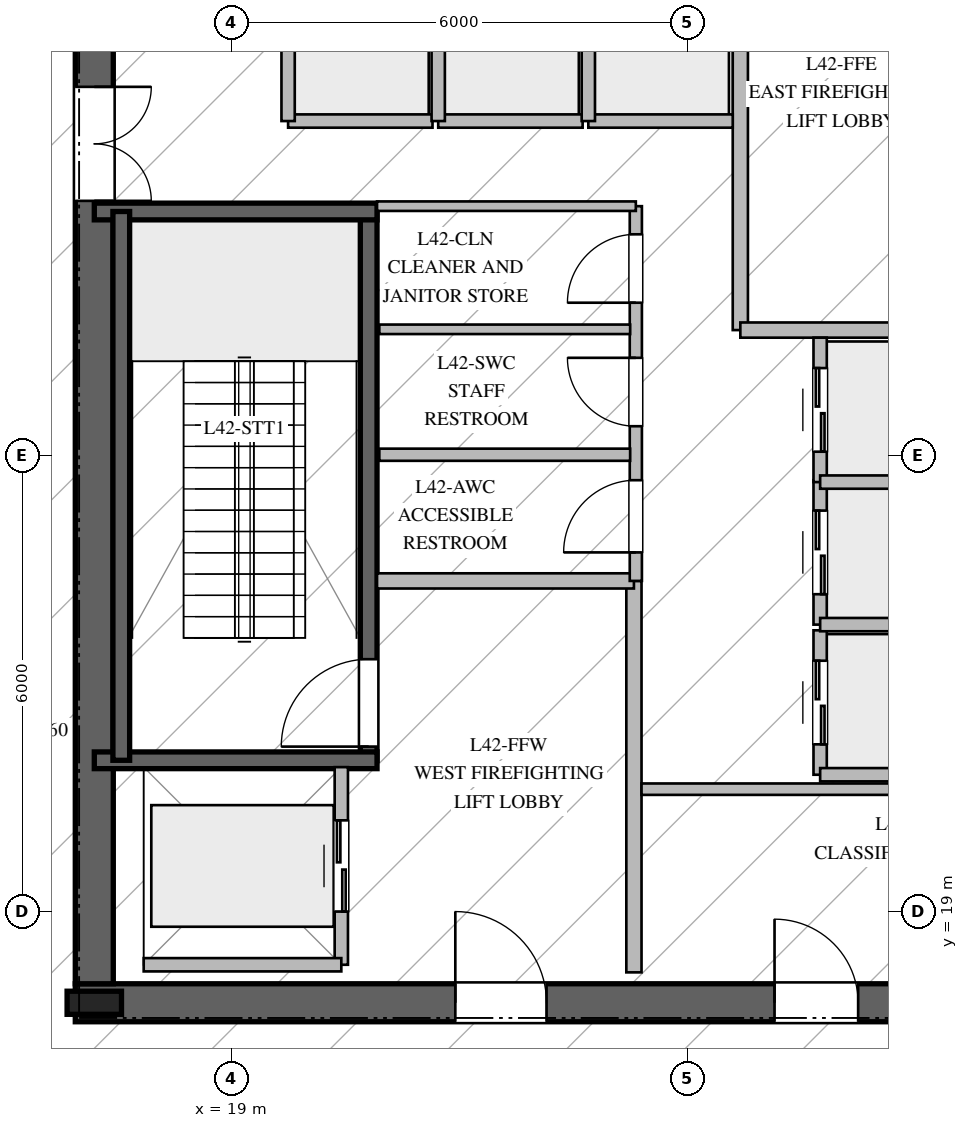
"""IFC4 building model, lengths in metres.
Left out: names, types, materials, properties, quantities, classifications, styles, units other than length and angle.
Written with IfcOpenShell. Run it as: python <this file> out.ifc"""

import sys

from ifc_helpers import new_model, si_unit, direction, frame, frame_2d, origin, origin_2d, place, context, subcontext, project, spatial, rectangle, i_section, extrude, element, fill, save


model = new_model("IFC4")
c1 = context("Model", 3, precision=1e-05, world=origin(), true_north=direction((0.0, 1.0)))
c2 = subcontext(c1, "Body", "Model", "MODEL_VIEW")
j1 = project(units=[si_unit("LENGTHUNIT", "METRE"), si_unit("PLANEANGLEUNIT", "RADIAN")], contexts=[c1])
p1 = place(None, origin())
s1 = spatial("IfcSite", under=j1, at=p1, CompositionType="ELEMENT")
p2 = place(p1, origin())
s2 = spatial("IfcBuilding", under=s1, at=p2, CompositionType="ELEMENT")
p3 = place(p2, frame((0.0, 0.0, 175.8)))
s3 = spatial("IfcBuildingStorey", under=s2, at=p3, CompositionType="ELEMENT", Elevation=175.8)
p4 = place(p3, frame((16.95, 17.8, 0.0), z_axis=(0.0, 0.0, 1.0), x_axis=(1.0, 0.0, 0.0)))
e1 = element("IfcWall", 1, at=p4, inside=s3, PredefinedType="SHEAR", context=c2, shape_type="SweptSolid", body=[
    extrude(rectangle(XDim=16.1, YDim=0.5, at=frame_2d((8.05, 0.0))), origin(), (0.0, 0.0, 1.0), 4.78),
])
p5 = place(p4, frame((5.0, 0.0, 0.0)))
e2 = element("IfcOpeningElement", 2, at=p5, cuts=e1, PredefinedType="OPENING", context=c2, shape_type="SweptSolid", body=[
    extrude(rectangle(XDim=1.2, YDim=2.25, at=frame_2d((0.6, 1.125))), frame((0.0, 0.26, 0.0), z_axis=(0.0, -1.0, 0.0), x_axis=(1.0, 0.0, 0.0)), (0.0, 0.0, 1.0), 0.52),
])
p6 = place(p4, frame((13.95, 0.0, 0.0)))
e3 = element("IfcOpeningElement", 3, at=p6, cuts=e1, PredefinedType="OPENING", context=c2, shape_type="SweptSolid", body=[
    extrude(rectangle(XDim=0.9, YDim=2.1, at=frame_2d((0.45, 1.05))), frame((0.0, 0.26, 0.0), z_axis=(0.0, -1.0, 0.0), x_axis=(1.0, 0.0, 0.0)), (0.0, 0.0, 1.0), 0.52),
])
p7 = place(p4, frame((9.2, 0.0, 0.0)))
e4 = element("IfcOpeningElement", 4, at=p7, cuts=e1, PredefinedType="OPENING", context=c2, shape_type="SweptSolid", body=[
    extrude(rectangle(XDim=1.1, YDim=2.2, at=frame_2d((0.55, 1.1))), frame((0.0, 0.26, 0.0), z_axis=(0.0, -1.0, 0.0), x_axis=(1.0, 0.0, 0.0)), (0.0, 0.0, 1.0), 0.52),
])
p8 = place(p3, frame((17.2, 31.95, 0.0), z_axis=(0.0, 0.0, 1.0), x_axis=(0.0, -1.0, 0.0)))
e5 = element("IfcWall", 5, at=p8, inside=s3, PredefinedType="SHEAR", context=c2, shape_type="SweptSolid", body=[
    extrude(rectangle(XDim=13.9, YDim=0.5, at=frame_2d((6.95, 0.0))), origin(), (0.0, 0.0, 1.0), 4.78),
])
p9 = place(p8, frame((2.1, 0.0, 0.0)))
e6 = element("IfcOpeningElement", 6, at=p9, cuts=e5, PredefinedType="OPENING", context=c2, shape_type="SweptSolid", body=[
    extrude(rectangle(XDim=1.5, YDim=2.2, at=frame_2d((0.75, 1.1))), frame((0.0, 0.26, 0.0), z_axis=(0.0, -1.0, 0.0), x_axis=(1.0, 0.0, 0.0)), (0.0, 0.0, 1.0), 0.52),
])
p10 = place(p3, frame((17.2, 17.8, 0.0), z_axis=(0.0, 0.0, 1.0), x_axis=(1.0, 0.0, 0.0)))
e7 = element("IfcColumn", 7, at=p10, inside=s3, PredefinedType="COLUMN", context=c2, shape_type="SweptSolid", body=[
    extrude(i_section(OverallWidth=0.304, OverallDepth=0.716, WebThickness=0.021, FlangeThickness=0.04, at=origin_2d()), origin(), (0.0, 0.0, 1.0), 5.0),
])
p11 = place(p3, frame((20.81, 20.99, 0.0), z_axis=(0.0, 0.0, 1.0), x_axis=(0.0, 1.0, 0.0)))
e8 = element("IfcWall", 8, at=p11, inside=s3, PredefinedType="SOLIDWALL", context=c2, shape_type="SweptSolid", body=[
    extrude(rectangle(XDim=7.22, YDim=0.22, at=frame_2d((3.61, 0.0))), origin(), (0.0, 0.0, 1.0), 4.78),
])
p12 = place(p11, frame((0.18, 0.0, 0.0)))
e9 = element("IfcOpeningElement", 9, at=p12, cuts=e8, PredefinedType="OPENING", context=c2, shape_type="SweptSolid", body=[
    extrude(rectangle(XDim=1.15, YDim=2.2, at=frame_2d((0.575, 1.1))), frame((0.0, 0.12, 0.0), z_axis=(0.0, -1.0, 0.0), x_axis=(1.0, 0.0, 0.0)), (0.0, 0.0, 1.0), 0.24),
])
for number, where, z_axis, x_axis in (
    (10, (17.2, 20.99, 0.0), (0.0, 0.0, 1.0), (1.0, 0.0, 0.0)),
    (11, (17.2, 28.21, 0.0), (0.0, 0.0, 1.0), (1.0, 0.0, 0.0)),
):
    element("IfcWall", number, at=place(p3, frame(where, z_axis=z_axis, x_axis=x_axis)), inside=s3, PredefinedType="SOLIDWALL", context=c2, shape_type="SweptSolid", body=[
        extrude(rectangle(XDim=3.72, YDim=0.22, at=frame_2d((1.86, 0.0))), origin(), (0.0, 0.0, 1.0), 4.78),
    ])
p13 = place(p3, frame((17.555, 28.21, 0.0), z_axis=(0.0, 0.0, 1.0), x_axis=(0.0, -1.0, 0.0)))
e12 = element("IfcWall", 12, at=p13, inside=s3, PredefinedType="SOLIDWALL", context=c2, shape_type="SweptSolid", body=[
    extrude(rectangle(XDim=7.22, YDim=0.22, at=frame_2d((3.61, 0.0))), origin(), (0.0, 0.0, 1.0), 4.78),
])
p14 = place(p3, frame((24.3, 18.2, 0.0), z_axis=(0.0, 0.0, 1.0), x_axis=(0.0, 1.0, 0.0)))
e13 = element("IfcWall", 13, at=p14, inside=s3, PredefinedType="PARTITIONING", context=c2, shape_type="SweptSolid", body=[
    extrude(rectangle(XDim=5.15, YDim=0.2, at=frame_2d((2.575, 0.0))), origin(), (0.0, 0.0, 1.0), 4.78),
])
p15 = place(p3, frame((20.92, 23.35, 0.0), z_axis=(0.0, 0.0, 1.0), x_axis=(1.0, 0.0, 0.0)))
e14 = element("IfcWall", 14, at=p15, inside=s3, PredefinedType="PARTITIONING", context=c2, shape_type="SweptSolid", body=[
    extrude(rectangle(XDim=3.38, YDim=0.2, at=frame_2d((1.69, 0.0))), origin(), (0.0, 0.0, 1.0), 4.78),
])
p16 = place(p3, frame((25.7, 26.65, 0.0), z_axis=(0.0, 0.0, 1.0), x_axis=(0.0, 1.0, 0.0)))
e15 = element("IfcWall", 15, at=p16, inside=s3, PredefinedType="PARTITIONING", context=c2, shape_type="SweptSolid", body=[
    extrude(rectangle(XDim=5.15, YDim=0.2, at=frame_2d((2.575, 0.0))), origin(), (0.0, 0.0, 1.0), 4.78),
])
p17 = place(p3, frame((25.7, 26.65, 0.0), z_axis=(0.0, 0.0, 1.0), x_axis=(1.0, 0.0, 0.0)))
e16 = element("IfcWall", 16, at=p17, inside=s3, PredefinedType="PARTITIONING", context=c2, shape_type="SweptSolid", body=[
    extrude(rectangle(XDim=3.38, YDim=0.2, at=frame_2d((1.69, 0.0))), origin(), (0.0, 0.0, 1.0), 4.78),
])
p18 = place(p3, frame((24.325, 23.35, 0.0), z_axis=(0.0, 0.0, 1.0), x_axis=(0.0, 1.0, 0.0)))
e17 = element("IfcWall", 17, at=p18, inside=s3, PredefinedType="PLUMBINGWALL", context=c2, shape_type="SweptSolid", body=[
    extrude(rectangle(XDim=4.93, YDim=0.16, at=frame_2d((2.465, 0.0))), origin(), (0.0, 0.0, 1.0), 4.78),
])
p19 = place(p18, frame((0.375, 0.0, 0.0)))
e18 = element("IfcOpeningElement", 18, at=p19, cuts=e17, PredefinedType="OPENING", context=c2, shape_type="SweptSolid", body=[
    extrude(rectangle(XDim=0.95, YDim=2.1, at=frame_2d((0.475, 1.05))), frame((0.0, 0.09, 0.0), z_axis=(0.0, -1.0, 0.0), x_axis=(1.0, 0.0, 0.0)), (0.0, 0.0, 1.0), 0.18),
])
p20 = place(p18, frame((2.035, 0.0, 0.0)))
e19 = element("IfcOpeningElement", 19, at=p20, cuts=e17, PredefinedType="OPENING", context=c2, shape_type="SweptSolid", body=[
    extrude(rectangle(XDim=0.9, YDim=2.1, at=frame_2d((0.45, 1.05))), frame((0.0, 0.09, 0.0), z_axis=(0.0, -1.0, 0.0), x_axis=(1.0, 0.0, 0.0)), (0.0, 0.0, 1.0), 0.18),
])
p21 = place(p18, frame((3.66, 0.0, 0.0)))
e20 = element("IfcOpeningElement", 20, at=p21, cuts=e17, PredefinedType="OPENING", context=c2, shape_type="SweptSolid", body=[
    extrude(rectangle(XDim=0.9, YDim=2.1, at=frame_2d((0.45, 1.05))), frame((0.0, 0.09, 0.0), z_axis=(0.0, -1.0, 0.0), x_axis=(1.0, 0.0, 0.0)), (0.0, 0.0, 1.0), 0.18),
])
p22 = place(p3, frame((20.92, 28.28, 0.0), z_axis=(0.0, 0.0, 1.0), x_axis=(1.0, 0.0, 0.0)))
e21 = element("IfcWall", 21, at=p22, inside=s3, PredefinedType="PARTITIONING", context=c2, shape_type="SweptSolid", body=[
    extrude(rectangle(XDim=3.405, YDim=0.125, at=frame_2d((1.703, 0.0))), origin(), (0.0, 0.0, 1.0), 4.78),
])
p23 = place(p3, frame((20.95, 25.01, 0.0), z_axis=(0.0, 0.0, 1.0), x_axis=(1.0, 0.0, 0.0)))
e22 = element("IfcWall", 22, at=p23, inside=s3, PredefinedType="PLUMBINGWALL", context=c2, shape_type="SweptSolid", body=[
    extrude(rectangle(XDim=3.3, YDim=0.16, at=frame_2d((1.65, 0.0))), origin(), (0.0, 0.0, 1.0), 4.78),
])
p24 = place(p3, frame((20.95, 26.66, 0.0), z_axis=(0.0, 0.0, 1.0), x_axis=(1.0, 0.0, 0.0)))
e23 = element("IfcWall", 23, at=p24, inside=s3, PredefinedType="PARTITIONING", context=c2, shape_type="SweptSolid", body=[
    extrude(rectangle(XDim=3.3, YDim=0.125, at=frame_2d((1.65, 0.0))), origin(), (0.0, 0.0, 1.0), 4.78),
])
p25 = place(p3, frame((24.4, 20.61, 0.0), z_axis=(0.0, 0.0, 1.0), x_axis=(1.0, 0.0, 0.0)))
e24 = element("IfcWall", 24, at=p25, inside=s3, PredefinedType="PARTITIONING", context=c2, shape_type="SweptSolid", body=[
    extrude(rectangle(XDim=5.9, YDim=0.15, at=frame_2d((2.95, 0.0))), origin(), (0.0, 0.0, 1.0), 4.78),
])
p26 = place(p3, frame((19.75, 29.4, 0.0), z_axis=(0.0, 0.0, 1.0), x_axis=(1.0, 0.0, 0.0)))
e25 = element("IfcWall", 25, at=p26, inside=s3, PredefinedType="PARTITIONING", context=c2, shape_type="SweptSolid", body=[
    extrude(rectangle(XDim=1.9, YDim=0.175, at=frame_2d((0.95, 0.0))), origin(), (0.0, 0.0, 1.0), 4.78),
])
p27 = place(p3, frame((19.75, 29.4, 0.0), z_axis=(0.0, 0.0, 1.0), x_axis=(0.0, 1.0, 0.0)))
e26 = element("IfcWall", 26, at=p27, inside=s3, PredefinedType="PARTITIONING", context=c2, shape_type="SweptSolid", body=[
    extrude(rectangle(XDim=2.35, YDim=0.175, at=frame_2d((1.175, 0.0))), origin(), (0.0, 0.0, 1.0), 4.78),
])
p28 = place(p3, frame((21.725, 29.4, 0.0), z_axis=(0.0, 0.0, 1.0), x_axis=(1.0, 0.0, 0.0)))
e27 = element("IfcWall", 27, at=p28, inside=s3, PredefinedType="PARTITIONING", context=c2, shape_type="SweptSolid", body=[
    extrude(rectangle(XDim=1.9, YDim=0.175, at=frame_2d((0.95, 0.0))), origin(), (0.0, 0.0, 1.0), 4.78),
])
p29 = place(p3, frame((21.725, 29.4, 0.0), z_axis=(0.0, 0.0, 1.0), x_axis=(0.0, 1.0, 0.0)))
e28 = element("IfcWall", 28, at=p29, inside=s3, PredefinedType="PARTITIONING", context=c2, shape_type="SweptSolid", body=[
    extrude(rectangle(XDim=2.35, YDim=0.175, at=frame_2d((1.175, 0.0))), origin(), (0.0, 0.0, 1.0), 4.78),
])
p30 = place(p3, frame((23.7, 29.4, 0.0), z_axis=(0.0, 0.0, 1.0), x_axis=(1.0, 0.0, 0.0)))
e29 = element("IfcWall", 29, at=p30, inside=s3, PredefinedType="PARTITIONING", context=c2, shape_type="SweptSolid", body=[
    extrude(rectangle(XDim=1.9, YDim=0.175, at=frame_2d((0.95, 0.0))), origin(), (0.0, 0.0, 1.0), 4.78),
])
p31 = place(p3, frame((23.7, 29.4, 0.0), z_axis=(0.0, 0.0, 1.0), x_axis=(0.0, 1.0, 0.0)))
e30 = element("IfcWall", 30, at=p31, inside=s3, PredefinedType="PARTITIONING", context=c2, shape_type="SweptSolid", body=[
    extrude(rectangle(XDim=2.35, YDim=0.175, at=frame_2d((1.175, 0.0))), origin(), (0.0, 0.0, 1.0), 4.78),
])
p32 = place(p3, frame((26.75, 20.8, 0.0), z_axis=(0.0, 0.0, 1.0), x_axis=(0.0, 1.0, 0.0)))
e31 = element("IfcWall", 31, at=p32, inside=s3, PredefinedType="PARTITIONING", context=c2, shape_type="SweptSolid", body=[
    extrude(rectangle(XDim=1.9, YDim=0.175, at=frame_2d((0.95, 0.0))), origin(), (0.0, 0.0, 1.0), 4.78),
])
p33 = place(p32, frame((0.4, 0.0, 0.0)))
e32 = element("IfcOpeningElement", 32, at=p33, cuts=e31, PredefinedType="OPENING", context=c2, shape_type="SweptSolid", body=[
    extrude(rectangle(XDim=1.1, YDim=2.2, at=frame_2d((0.55, 1.1))), frame((0.0, 0.098, 0.0), z_axis=(0.0, -1.0, 0.0), x_axis=(1.0, 0.0, 0.0)), (0.0, 0.0, 1.0), 0.195),
])
p34 = place(p3, frame((26.75, 20.8, 0.0), z_axis=(0.0, 0.0, 1.0), x_axis=(1.0, 0.0, 0.0)))
e33 = element("IfcWall", 33, at=p34, inside=s3, PredefinedType="PARTITIONING", context=c2, shape_type="SweptSolid", body=[
    extrude(rectangle(XDim=2.35, YDim=0.175, at=frame_2d((1.175, 0.0))), origin(), (0.0, 0.0, 1.0), 4.78),
])
p35 = place(p3, frame((26.75, 22.775, 0.0), z_axis=(0.0, 0.0, 1.0), x_axis=(0.0, 1.0, 0.0)))
e34 = element("IfcWall", 34, at=p35, inside=s3, PredefinedType="PARTITIONING", context=c2, shape_type="SweptSolid", body=[
    extrude(rectangle(XDim=1.9, YDim=0.175, at=frame_2d((0.95, 0.0))), origin(), (0.0, 0.0, 1.0), 4.78),
])
p36 = place(p35, frame((0.4, 0.0, 0.0)))
e35 = element("IfcOpeningElement", 35, at=p36, cuts=e34, PredefinedType="OPENING", context=c2, shape_type="SweptSolid", body=[
    extrude(rectangle(XDim=1.1, YDim=2.2, at=frame_2d((0.55, 1.1))), frame((0.0, 0.098, 0.0), z_axis=(0.0, -1.0, 0.0), x_axis=(1.0, 0.0, 0.0)), (0.0, 0.0, 1.0), 0.195),
])
p37 = place(p3, frame((26.75, 22.775, 0.0), z_axis=(0.0, 0.0, 1.0), x_axis=(1.0, 0.0, 0.0)))
e36 = element("IfcWall", 36, at=p37, inside=s3, PredefinedType="PARTITIONING", context=c2, shape_type="SweptSolid", body=[
    extrude(rectangle(XDim=2.35, YDim=0.175, at=frame_2d((1.175, 0.0))), origin(), (0.0, 0.0, 1.0), 4.78),
])
p38 = place(p3, frame((26.75, 24.65, 0.0), z_axis=(0.0, 0.0, 1.0), x_axis=(0.0, 1.0, 0.0)))
e37 = element("IfcWall", 37, at=p38, inside=s3, PredefinedType="PARTITIONING", context=c2, shape_type="SweptSolid", body=[
    extrude(rectangle(XDim=1.9, YDim=0.175, at=frame_2d((0.95, 0.0))), origin(), (0.0, 0.0, 1.0), 4.78),
])
p39 = place(p38, frame((0.4, 0.0, 0.0)))
e38 = element("IfcOpeningElement", 38, at=p39, cuts=e37, PredefinedType="OPENING", context=c2, shape_type="SweptSolid", body=[
    extrude(rectangle(XDim=1.1, YDim=2.2, at=frame_2d((0.55, 1.1))), frame((0.0, 0.098, 0.0), z_axis=(0.0, -1.0, 0.0), x_axis=(1.0, 0.0, 0.0)), (0.0, 0.0, 1.0), 0.195),
])
p40 = place(p3, frame((26.75, 24.65, 0.0), z_axis=(0.0, 0.0, 1.0), x_axis=(1.0, 0.0, 0.0)))
e39 = element("IfcWall", 39, at=p40, inside=s3, PredefinedType="PARTITIONING", context=c2, shape_type="SweptSolid", body=[
    extrude(rectangle(XDim=2.35, YDim=0.175, at=frame_2d((1.175, 0.0))), origin(), (0.0, 0.0, 1.0), 4.78),
])
p41 = place(p3, frame((20.45, 18.3, 0.0), z_axis=(0.0, 0.0, 1.0), x_axis=(0.0, 1.0, 0.0)))
e40 = element("IfcWall", 40, at=p41, inside=s3, PredefinedType="PARTITIONING", context=c2, shape_type="SweptSolid", body=[
    extrude(rectangle(XDim=2.6, YDim=0.175, at=frame_2d((1.3, 0.0))), origin(), (0.0, 0.0, 1.0), 4.78),
])
p42 = place(p41, frame((0.7, 0.0, 0.0)))
e41 = element("IfcOpeningElement", 41, at=p42, cuts=e40, PredefinedType="OPENING", context=c2, shape_type="SweptSolid", body=[
    extrude(rectangle(XDim=1.2, YDim=2.2, at=frame_2d((0.6, 1.1))), frame((0.0, 0.098, 0.0), z_axis=(0.0, -1.0, 0.0), x_axis=(1.0, 0.0, 0.0)), (0.0, 0.0, 1.0), 0.195),
])
p43 = place(p3, frame((17.85, 18.3, 0.0), z_axis=(0.0, 0.0, 1.0), x_axis=(1.0, 0.0, 0.0)))
e42 = element("IfcWall", 42, at=p43, inside=s3, PredefinedType="PARTITIONING", context=c2, shape_type="SweptSolid", body=[
    extrude(rectangle(XDim=2.6, YDim=0.175, at=frame_2d((1.3, 0.0))), origin(), (0.0, 0.0, 1.0), 4.78),
])
p44 = place(p12, origin())
e43 = element("IfcDoor", 43, at=p44, inside=s3, OperationType="SINGLE_SWING_LEFT", PredefinedType="DOOR", context=c2, shape_type="SweptSolid", body=[
    extrude(rectangle(XDim=1.15, YDim=2.2, at=frame_2d((0.575, 1.1))), frame((0.0, 0.025, 0.0), z_axis=(0.0, -1.0, 0.0), x_axis=(1.0, 0.0, 0.0)), (0.0, 0.0, 1.0), 0.05),
])
fill(e9, e43)
p45 = place(p5, origin())
e44 = element("IfcDoor", 44, at=p45, inside=s3, OperationType="SINGLE_SWING_LEFT", PredefinedType="DOOR", context=c2, shape_type="SweptSolid", body=[
    extrude(rectangle(XDim=1.2, YDim=2.25, at=frame_2d((0.6, 1.125))), frame((0.0, 0.025, 0.0), z_axis=(0.0, -1.0, 0.0), x_axis=(1.0, 0.0, 0.0)), (0.0, 0.0, 1.0), 0.05),
])
fill(e2, e44)
p46 = place(p9, origin())
e45 = element("IfcDoor", 45, at=p46, inside=s3, OperationType="DOUBLE_DOOR_SINGLE_SWING", PredefinedType="DOOR", context=c2, shape_type="SweptSolid", body=[
    extrude(rectangle(XDim=1.5, YDim=2.2, at=frame_2d((0.75, 1.1))), frame((0.0, 0.025, 0.0), z_axis=(0.0, -1.0, 0.0), x_axis=(1.0, 0.0, 0.0)), (0.0, 0.0, 1.0), 0.05),
])
fill(e6, e45)
p47 = place(p19, origin())
e46 = element("IfcDoor", 46, at=p47, inside=s3, OperationType="SINGLE_SWING_LEFT", PredefinedType="DOOR", context=c2, shape_type="SweptSolid", body=[
    extrude(rectangle(XDim=0.95, YDim=2.1, at=frame_2d((0.475, 1.05))), frame((0.0, 0.025, 0.0), z_axis=(0.0, -1.0, 0.0), x_axis=(1.0, 0.0, 0.0)), (0.0, 0.0, 1.0), 0.05),
])
fill(e18, e46)
p48 = place(p20, origin())
e47 = element("IfcDoor", 47, at=p48, inside=s3, OperationType="SINGLE_SWING_RIGHT", PredefinedType="DOOR", context=c2, shape_type="SweptSolid", body=[
    extrude(rectangle(XDim=0.9, YDim=2.1, at=frame_2d((0.45, 1.05))), frame((0.0, 0.025, 0.0), z_axis=(0.0, -1.0, 0.0), x_axis=(1.0, 0.0, 0.0)), (0.0, 0.0, 1.0), 0.05),
])
fill(e19, e47)
p49 = place(p21, origin())
e48 = element("IfcDoor", 48, at=p49, inside=s3, OperationType="SINGLE_SWING_LEFT", PredefinedType="DOOR", context=c2, shape_type="SweptSolid", body=[
    extrude(rectangle(XDim=0.9, YDim=2.1, at=frame_2d((0.45, 1.05))), frame((0.0, 0.025, 0.0), z_axis=(0.0, -1.0, 0.0), x_axis=(1.0, 0.0, 0.0)), (0.0, 0.0, 1.0), 0.05),
])
fill(e20, e48)
p50 = place(p7, origin())
e49 = element("IfcDoor", 49, at=p50, inside=s3, OperationType="SINGLE_SWING_LEFT", PredefinedType="DOOR", context=c2, shape_type="SweptSolid", body=[
    extrude(rectangle(XDim=1.1, YDim=2.2, at=frame_2d((0.55, 1.1))), frame((0.0, 0.025, 0.0), z_axis=(0.0, -1.0, 0.0), x_axis=(1.0, 0.0, 0.0)), (0.0, 0.0, 1.0), 0.05),
])
fill(e4, e49)
p51 = place(p33, origin())
e50 = element("IfcDoor", 50, at=p51, inside=s3, OperationType="DOUBLE_DOOR_SLIDING", PredefinedType="DOOR", context=c2, shape_type="SweptSolid", body=[
    extrude(rectangle(XDim=1.1, YDim=2.2, at=frame_2d((0.55, 1.1))), frame((0.0, 0.025, 0.0), z_axis=(0.0, -1.0, 0.0), x_axis=(1.0, 0.0, 0.0)), (0.0, 0.0, 1.0), 0.05),
])
fill(e32, e50)
p52 = place(p36, origin())
e51 = element("IfcDoor", 51, at=p52, inside=s3, OperationType="DOUBLE_DOOR_SLIDING", PredefinedType="DOOR", context=c2, shape_type="SweptSolid", body=[
    extrude(rectangle(XDim=1.1, YDim=2.2, at=frame_2d((0.55, 1.1))), frame((0.0, 0.025, 0.0), z_axis=(0.0, -1.0, 0.0), x_axis=(1.0, 0.0, 0.0)), (0.0, 0.0, 1.0), 0.05),
])
fill(e35, e51)
p53 = place(p39, origin())
e52 = element("IfcDoor", 52, at=p53, inside=s3, OperationType="DOUBLE_DOOR_SLIDING", PredefinedType="DOOR", context=c2, shape_type="SweptSolid", body=[
    extrude(rectangle(XDim=1.1, YDim=2.2, at=frame_2d((0.55, 1.1))), frame((0.0, 0.025, 0.0), z_axis=(0.0, -1.0, 0.0), x_axis=(1.0, 0.0, 0.0)), (0.0, 0.0, 1.0), 0.05),
])
fill(e38, e52)
p54 = place(p42, origin())
e53 = element("IfcDoor", 53, at=p54, inside=s3, OperationType="DOUBLE_DOOR_SLIDING", PredefinedType="DOOR", context=c2, shape_type="SweptSolid", body=[
    extrude(rectangle(XDim=1.2, YDim=2.2, at=frame_2d((0.6, 1.1))), frame((0.0, 0.025, 0.0), z_axis=(0.0, -1.0, 0.0), x_axis=(1.0, 0.0, 0.0)), (0.0, 0.0, 1.0), 0.05),
])
fill(e41, e53)
save(model, sys.argv[1])
